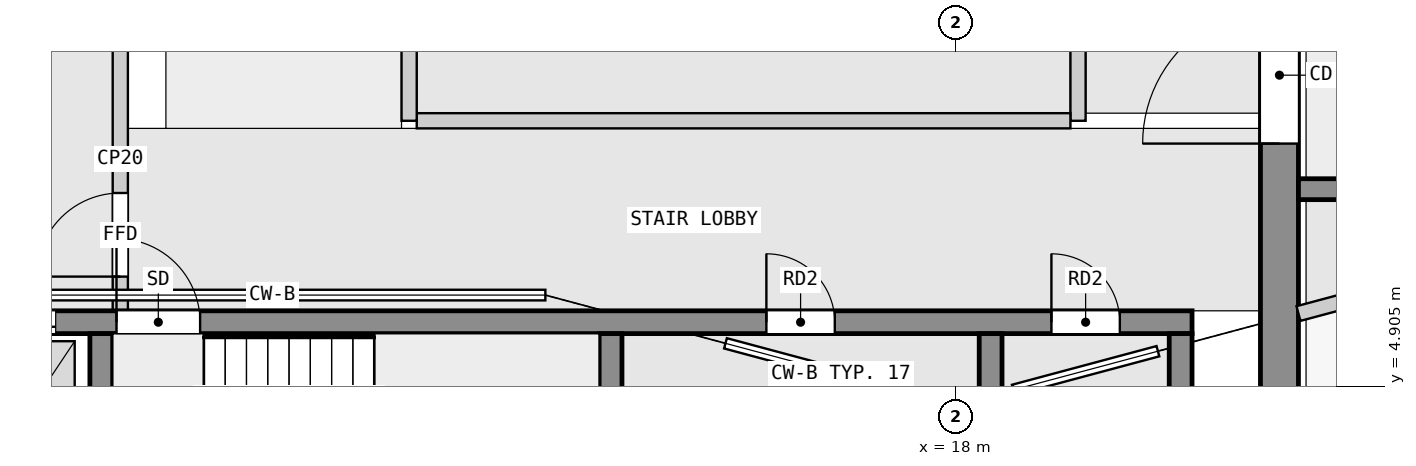
"""IFC4 building model, lengths in metres.
Left out: names, types, materials, properties, quantities, classifications, styles, units other than length and angle.
Written with IfcOpenShell. Run it as: python <this file> out.ifc"""

import sys

from ifc_helpers import new_model, si_unit, direction, frame, frame_2d, origin, place, context, subcontext, project, spatial, rectangle, extrude, element, fill, save


model = new_model("IFC4")
c1 = context("Model", 3, precision=1e-05, world=origin(), true_north=direction((0.0, 1.0)))
c2 = subcontext(c1, "Body", "Model", "MODEL_VIEW")
j1 = project(units=[si_unit("LENGTHUNIT", "METRE"), si_unit("PLANEANGLEUNIT", "RADIAN")], contexts=[c1])
p1 = place(None, origin())
s1 = spatial("IfcSite", under=j1, at=p1, CompositionType="ELEMENT")
p2 = place(p1, origin())
s2 = spatial("IfcBuilding", under=s1, at=p2, CompositionType="ELEMENT")
p3 = place(p2, frame((0.0, 0.0, 236.4)))
s3 = spatial("IfcBuildingStorey", under=s2, at=p3, CompositionType="ELEMENT", Elevation=236.4)
p4 = place(p3, frame((22.25, 2.5, 0.0), z_axis=(0.0, 0.0, 1.0), x_axis=(0.0, 1.0, 0.0)))
e1 = element("IfcWall", 1, at=p4, inside=s3, PredefinedType="SHEAR", context=c2, shape_type="SweptSolid", body=[
    extrude(rectangle(XDim=15.0, YDim=0.5, at=frame_2d((7.5, 0.0))), origin(), (0.0, 0.0, 1.0), 5.75),
])
p5 = place(p4, frame((5.6, 0.0, 0.0)))
e2 = element("IfcOpeningElement", 2, at=p5, cuts=e1, PredefinedType="OPENING", context=c2, shape_type="SweptSolid", body=[
    extrude(rectangle(XDim=1.8, YDim=2.1, at=frame_2d((0.9, 1.05))), frame((0.0, 0.26, 0.0), z_axis=(0.0, -1.0, 0.0), x_axis=(1.0, 0.0, 0.0)), (0.0, 0.0, 1.0), 0.52),
])
for number, where, z_axis, x_axis in (
    (3, (6.75, 2.8, 0.0), (0.0, 0.0, 1.0), (0.0, 1.0, 0.0)),
    (4, (13.45, 2.8, 0.0), (0.0, 0.0, 1.0), (0.0, 1.0, 0.0)),
    (5, (18.45, 2.8, 0.0), (0.0, 0.0, 1.0), (0.0, 1.0, 0.0)),
    (6, (20.95, 2.8, 0.0), (0.0, 0.0, 1.0), (0.0, 1.0, 0.0)),
):
    element("IfcWall", number, at=place(p3, frame(where, z_axis=z_axis, x_axis=x_axis)), inside=s3, PredefinedType="SHEAR", context=c2, shape_type="SweptSolid", body=[
        extrude(rectangle(XDim=2.8, YDim=0.3, at=frame_2d((1.4, 0.0))), origin(), (0.0, 0.0, 1.0), 5.75),
    ])
p6 = place(p3, frame((2.3, 5.75, 0.0), z_axis=(0.0, 0.0, 1.0), x_axis=(1.0, 0.0, 0.0)))
e7 = element("IfcWall", 7, at=p6, inside=s3, PredefinedType="SHEAR", context=c2, shape_type="SweptSolid", body=[
    extrude(rectangle(XDim=18.8, YDim=0.3, at=frame_2d((9.4, 0.0))), origin(), (0.0, 0.0, 1.0), 5.75),
])
p7 = place(p6, frame((4.65, 0.0, 0.0)))
e8 = element("IfcOpeningElement", 8, at=p7, cuts=e7, PredefinedType="OPENING", context=c2, shape_type="SweptSolid", body=[
    extrude(rectangle(XDim=1.1, YDim=2.1, at=frame_2d((0.55, 1.05))), frame((0.0, 0.16, 0.0), z_axis=(0.0, -1.0, 0.0), x_axis=(1.0, 0.0, 0.0)), (0.0, 0.0, 1.0), 0.32),
])
p8 = place(p6, frame((0.45, 0.0, 0.0)))
e9 = element("IfcOpeningElement", 9, at=p8, cuts=e7, PredefinedType="OPENING", context=c2, shape_type="SweptSolid", body=[
    extrude(rectangle(XDim=1.1, YDim=2.1, at=frame_2d((0.55, 1.05))), frame((0.0, 0.16, 0.0), z_axis=(0.0, -1.0, 0.0), x_axis=(1.0, 0.0, 0.0)), (0.0, 0.0, 1.0), 0.32),
])
p9 = place(p6, frame((2.75, 0.0, 0.0)))
e10 = element("IfcOpeningElement", 10, at=p9, cuts=e7, PredefinedType="OPENING", context=c2, shape_type="SweptSolid", body=[
    extrude(rectangle(XDim=1.1, YDim=2.1, at=frame_2d((0.55, 1.05))), frame((0.0, 0.16, 0.0), z_axis=(0.0, -1.0, 0.0), x_axis=(1.0, 0.0, 0.0)), (0.0, 0.0, 1.0), 0.32),
])
p10 = place(p6, frame((13.2, 0.0, 0.0)))
e11 = element("IfcOpeningElement", 11, at=p10, cuts=e7, PredefinedType="OPENING", context=c2, shape_type="SweptSolid", body=[
    extrude(rectangle(XDim=0.9, YDim=2.1, at=frame_2d((0.45, 1.05))), frame((0.0, 0.16, 0.0), z_axis=(0.0, -1.0, 0.0), x_axis=(1.0, 0.0, 0.0)), (0.0, 0.0, 1.0), 0.32),
])
p11 = place(p6, frame((16.95, 0.0, 0.0)))
e12 = element("IfcOpeningElement", 12, at=p11, cuts=e7, PredefinedType="OPENING", context=c2, shape_type="SweptSolid", body=[
    extrude(rectangle(XDim=0.9, YDim=2.1, at=frame_2d((0.45, 1.05))), frame((0.0, 0.16, 0.0), z_axis=(0.0, -1.0, 0.0), x_axis=(1.0, 0.0, 0.0)), (0.0, 0.0, 1.0), 0.32),
])
p12 = place(p3, frame((22.5, 7.5, 0.0), z_axis=(0.0, 0.0, 1.0), x_axis=(1.0, 0.0, 0.0)))
e13 = element("IfcWall", 13, at=p12, inside=s3, PredefinedType="SHEAR", context=c2, shape_type="SweptSolid", body=[
    extrude(rectangle(XDim=22.5, YDim=0.275, at=frame_2d((11.25, 0.0))), origin(), (0.0, 0.0, 1.0), 5.75),
])
p13 = place(p12, frame((20.1, 0.0, 0.0)))
e14 = element("IfcOpeningElement", 14, at=p13, cuts=e13, PredefinedType="OPENING", context=c2, shape_type="SweptSolid", body=[
    extrude(rectangle(XDim=1.8, YDim=2.1, at=frame_2d((0.9, 1.05))), frame((0.0, 0.147, 0.0), z_axis=(0.0, -1.0, 0.0), x_axis=(1.0, 0.0, 0.0)), (0.0, 0.0, 1.0), 0.295),
])
p14 = place(p12, frame((6.1, 0.0, 0.0)))
e15 = element("IfcOpeningElement", 15, at=p14, cuts=e13, PredefinedType="OPENING", context=c2, shape_type="SweptSolid", body=[
    extrude(rectangle(XDim=1.1, YDim=2.1, at=frame_2d((0.55, 1.05))), frame((0.0, 0.147, 0.0), z_axis=(0.0, -1.0, 0.0), x_axis=(1.0, 0.0, 0.0)), (0.0, 0.0, 1.0), 0.295),
])
p15 = place(p12, frame((16.1, 0.0, 0.0)))
e16 = element("IfcOpeningElement", 16, at=p15, cuts=e13, PredefinedType="OPENING", context=c2, shape_type="SweptSolid", body=[
    extrude(rectangle(XDim=1.0, YDim=2.1, at=frame_2d((0.5, 1.05))), frame((0.0, 0.147, 0.0), z_axis=(0.0, -1.0, 0.0), x_axis=(1.0, 0.0, 0.0)), (0.0, 0.0, 1.0), 0.295),
])
p16 = place(p3, frame((7.0, 5.9, 0.0), z_axis=(0.0, 0.0, 1.0), x_axis=(0.0, 1.0, 0.0)))
e17 = element("IfcWall", 17, at=p16, inside=s3, PredefinedType="PARTITIONING", context=c2, shape_type="SweptSolid", body=[
    extrude(rectangle(XDim=4.0, YDim=0.2, at=frame_2d((2.0, 0.0))), origin(), (0.0, 0.0, 1.0), 5.75),
])
p17 = place(p16, frame((0.45, 0.0, 0.0)))
e18 = element("IfcOpeningElement", 18, at=p17, cuts=e17, PredefinedType="OPENING", context=c2, shape_type="SweptSolid", body=[
    extrude(rectangle(XDim=1.1, YDim=2.1, at=frame_2d((0.55, 1.05))), frame((0.0, 0.11, 0.0), z_axis=(0.0, -1.0, 0.0), x_axis=(1.0, 0.0, 0.0)), (0.0, 0.0, 1.0), 0.22),
])
p18 = place(p3, frame((10.8, 8.4, 0.0), z_axis=(0.0, 0.0, 1.0), x_axis=(0.0, 1.0, 0.0)))
e19 = element("IfcWall", 19, at=p18, inside=s3, PredefinedType="PARTITIONING", context=c2, shape_type="SweptSolid", body=[
    extrude(rectangle(XDim=3.8, YDim=0.2, at=frame_2d((1.9, 0.0))), origin(), (0.0, 0.0, 1.0), 5.75),
])
p19 = place(p3, frame((10.9, 8.4, 0.0), z_axis=(0.0, 0.0, 1.0), x_axis=(1.0, 0.0, 0.0)))
e20 = element("IfcWall", 20, at=p19, inside=s3, PredefinedType="PARTITIONING", context=c2, shape_type="SweptSolid", body=[
    extrude(rectangle(XDim=8.6, YDim=0.2, at=frame_2d((4.3, 0.0))), origin(), (0.0, 0.0, 1.0), 5.75),
])
p20 = place(p3, frame((19.6, 8.4, 0.0), z_axis=(0.0, 0.0, 1.0), x_axis=(0.0, 1.0, 0.0)))
e21 = element("IfcWall", 21, at=p20, inside=s3, PredefinedType="PARTITIONING", context=c2, shape_type="SweptSolid", body=[
    extrude(rectangle(XDim=3.8, YDim=0.2, at=frame_2d((1.9, 0.0))), origin(), (0.0, 0.0, 1.0), 5.75),
])
p21 = place(p3, frame((22.5, 5.864, 0.0), z_axis=(0.0, 0.0, 1.0), x_axis=(0.96602336302, 0.258454758323, 0.0)))
e22 = element("IfcWall", 22, at=p21, inside=s3, PredefinedType="PARTITIONING", context=c2, shape_type="SweptSolid", body=[
    extrude(rectangle(XDim=0.94, YDim=0.2, at=frame_2d((0.47, 0.0))), origin(), (0.0, 0.0, 1.0), 5.75),
])
p22 = place(p17, origin())
e23 = element("IfcDoor", 23, at=p22, inside=s3, OperationType="SINGLE_SWING_LEFT", PredefinedType="DOOR", context=c2, shape_type="SweptSolid", body=[
    extrude(rectangle(XDim=1.1, YDim=2.1, at=frame_2d((0.55, 1.05))), frame((0.0, 0.025, 0.0), z_axis=(0.0, -1.0, 0.0), x_axis=(1.0, 0.0, 0.0)), (0.0, 0.0, 1.0), 0.05),
])
fill(e18, e23)
p23 = place(p7, origin())
e24 = element("IfcDoor", 24, at=p23, inside=s3, OperationType="SINGLE_SWING_LEFT", PredefinedType="DOOR", context=c2, shape_type="SweptSolid", body=[
    extrude(rectangle(XDim=1.1, YDim=2.1, at=frame_2d((0.55, 1.05))), frame((0.0, 0.025, 0.0), z_axis=(0.0, -1.0, 0.0), x_axis=(1.0, 0.0, 0.0)), (0.0, 0.0, 1.0), 0.05),
])
fill(e8, e24)
p24 = place(p9, origin())
e25 = element("IfcDoor", 25, at=p24, inside=s3, OperationType="DOUBLE_DOOR_SLIDING", PredefinedType="DOOR", context=c2, shape_type="SweptSolid", body=[
    extrude(rectangle(XDim=1.1, YDim=2.1, at=frame_2d((0.55, 1.05))), frame((0.0, 0.025, 0.0), z_axis=(0.0, -1.0, 0.0), x_axis=(1.0, 0.0, 0.0)), (0.0, 0.0, 1.0), 0.05),
])
fill(e10, e25)
p25 = place(p5, origin())
e26 = element("IfcDoor", 26, at=p25, inside=s3, OperationType="DOUBLE_DOOR_SINGLE_SWING", PredefinedType="DOOR", context=c2, shape_type="SweptSolid", body=[
    extrude(rectangle(XDim=1.8, YDim=2.1, at=frame_2d((0.9, 1.05))), frame((0.0, 0.025, 0.0), z_axis=(0.0, -1.0, 0.0), x_axis=(1.0, 0.0, 0.0)), (0.0, 0.0, 1.0), 0.05),
])
fill(e2, e26)
p26 = place(p10, origin())
e27 = element("IfcDoor", 27, at=p26, inside=s3, OperationType="SINGLE_SWING_LEFT", PredefinedType="DOOR", context=c2, shape_type="SweptSolid", body=[
    extrude(rectangle(XDim=0.9, YDim=2.1, at=frame_2d((0.45, 1.05))), frame((0.0, 0.025, 0.0), z_axis=(0.0, -1.0, 0.0), x_axis=(1.0, 0.0, 0.0)), (0.0, 0.0, 1.0), 0.05),
])
fill(e11, e27)
p27 = place(p11, origin())
e28 = element("IfcDoor", 28, at=p27, inside=s3, OperationType="SINGLE_SWING_LEFT", PredefinedType="DOOR", context=c2, shape_type="SweptSolid", body=[
    extrude(rectangle(XDim=0.9, YDim=2.1, at=frame_2d((0.45, 1.05))), frame((0.0, 0.025, 0.0), z_axis=(0.0, -1.0, 0.0), x_axis=(1.0, 0.0, 0.0)), (0.0, 0.0, 1.0), 0.05),
])
fill(e12, e28)
save(model, sys.argv[1])
